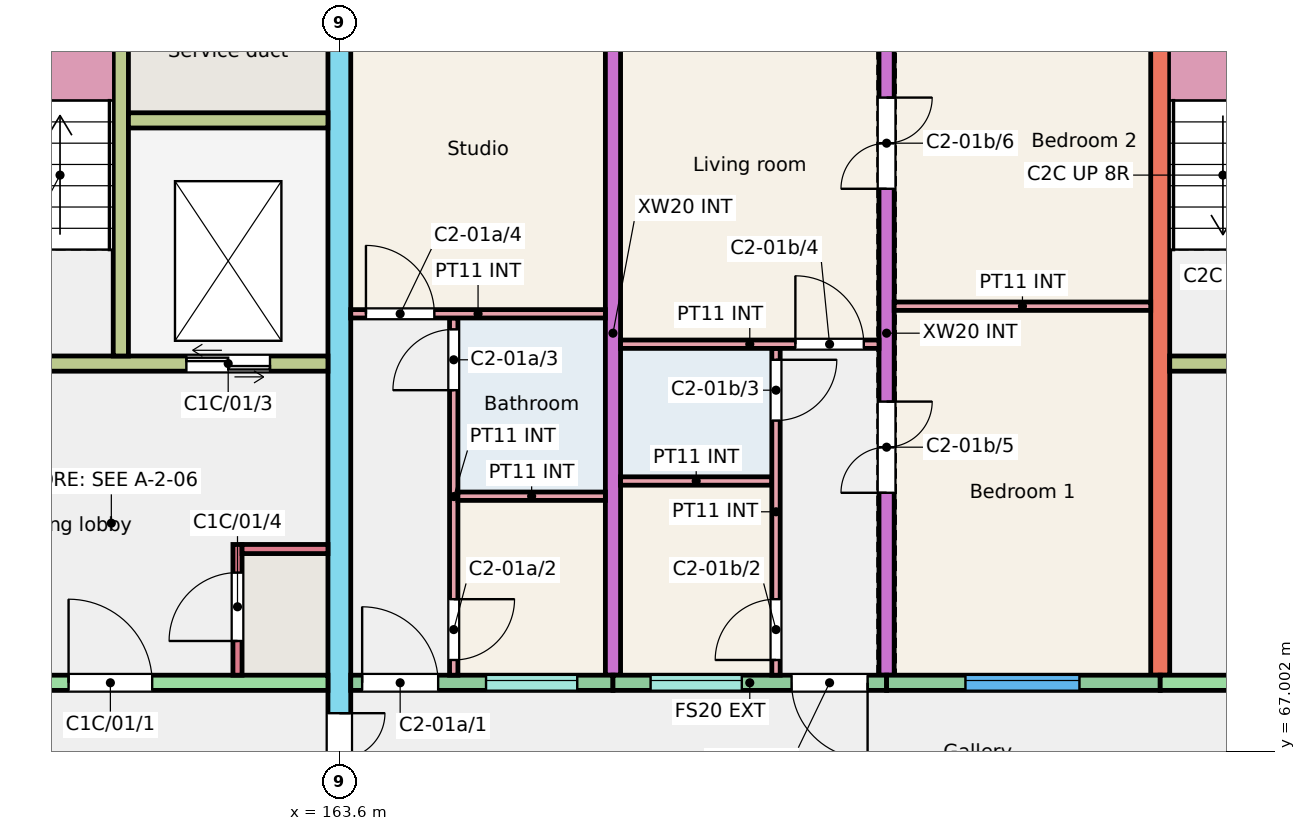
"""IFC4 building model, lengths in metres.
Left out: names, types, materials, properties, quantities, classifications, styles, units other than length and angle.
Written with IfcOpenShell. Run it as: python <this file> out.ifc"""

import sys

from ifc_helpers import new_model, si_unit, direction, frame, frame_2d, origin, place, context, subcontext, project, spatial, rectangle, extrude, element, fill, save


model = new_model("IFC4")
c1 = context("Model", 3, precision=1e-05, world=origin(), true_north=direction((0.0, 1.0)))
c2 = subcontext(c1, "Body", "Model", "MODEL_VIEW")
j1 = project(units=[si_unit("LENGTHUNIT", "METRE"), si_unit("PLANEANGLEUNIT", "RADIAN")], contexts=[c1])
p1 = place(None, origin())
s1 = spatial("IfcSite", under=j1, at=p1, CompositionType="ELEMENT")
p2 = place(p1, origin())
s2 = spatial("IfcBuilding", under=s1, at=p2, CompositionType="ELEMENT")
p3 = place(p2, frame((0.0, 0.0, 3.0)))
s3 = spatial("IfcBuildingStorey", under=s2, at=p3, CompositionType="ELEMENT", Elevation=3.0)
p4 = place(p3, frame((163.6, 66.0, 0.0), z_axis=(0.0, 0.0, 1.0), x_axis=(0.0, 1.0, 0.0)))
e1 = element("IfcWall", 1, at=p4, inside=s3, PredefinedType="SHEAR", context=c2, shape_type="SweptSolid", body=[
    extrude(rectangle(XDim=11.0, YDim=0.3, at=frame_2d((5.5, 0.0))), origin(), (0.0, 0.0, 1.0), 3.0),
])
p5 = place(p4, frame((0.3, 0.0, 0.0)))
e2 = element("IfcOpeningElement", 2, at=p5, cuts=e1, PredefinedType="OPENING", context=c2, shape_type="SweptSolid", body=[
    extrude(rectangle(XDim=1.2, YDim=2.1, at=frame_2d((0.6, 1.05))), frame((0.0, 0.16, 0.0), z_axis=(0.0, -1.0, 0.0), x_axis=(1.0, 0.0, 0.0)), (0.0, 0.0, 1.0), 0.32),
])
p6 = place(p3, frame((167.2, 68.0, 0.0), z_axis=(0.0, 0.0, 1.0), x_axis=(0.0, 1.0, 0.0)))
e3 = element("IfcWall", 3, at=p6, inside=s3, PredefinedType="SHEAR", context=c2, shape_type="SweptSolid", body=[
    extrude(rectangle(XDim=9.0, YDim=0.2, at=frame_2d((4.5, 0.0))), origin(), (0.0, 0.0, 1.0), 3.0),
])
p7 = place(p3, frame((170.8, 68.0, 0.0), z_axis=(0.0, 0.0, 1.0), x_axis=(0.0, 1.0, 0.0)))
e4 = element("IfcWall", 4, at=p7, inside=s3, PredefinedType="SHEAR", context=c2, shape_type="SweptSolid", body=[
    extrude(rectangle(XDim=9.0, YDim=0.2, at=frame_2d((4.5, 0.0))), origin(), (0.0, 0.0, 1.0), 3.0),
])
p8 = place(p7, frame((2.4, 0.0, 0.0)))
e5 = element("IfcOpeningElement", 5, at=p8, cuts=e4, PredefinedType="OPENING", context=c2, shape_type="SweptSolid", body=[
    extrude(rectangle(XDim=1.2, YDim=2.1, at=frame_2d((0.6, 1.05))), frame((0.0, 0.11, 0.0), z_axis=(0.0, -1.0, 0.0), x_axis=(1.0, 0.0, 0.0)), (0.0, 0.0, 1.0), 0.22),
])
p9 = place(p7, frame((6.4, 0.0, 0.0)))
e6 = element("IfcOpeningElement", 6, at=p9, cuts=e4, PredefinedType="OPENING", context=c2, shape_type="SweptSolid", body=[
    extrude(rectangle(XDim=1.2, YDim=2.1, at=frame_2d((0.6, 1.05))), frame((0.0, 0.11, 0.0), z_axis=(0.0, -1.0, 0.0), x_axis=(1.0, 0.0, 0.0)), (0.0, 0.0, 1.0), 0.22),
])
p10 = place(p3, frame((174.4, 68.0, 0.0), z_axis=(0.0, 0.0, 1.0), x_axis=(0.0, 1.0, 0.0)))
e7 = element("IfcWall", 7, at=p10, inside=s3, PredefinedType="SHEAR", context=c2, shape_type="SweptSolid", body=[
    extrude(rectangle(XDim=9.0, YDim=0.25, at=frame_2d((4.5, 0.0))), origin(), (0.0, 0.0, 1.0), 3.0),
])
p11 = place(p3, frame((157.6, 67.9, 0.0), z_axis=(0.0, 0.0, 1.0), x_axis=(1.0, 0.0, 0.0)))
e8 = element("IfcWall", 8, at=p11, inside=s3, PredefinedType="SHEAR", context=c2, shape_type="SweptSolid", body=[
    extrude(rectangle(XDim=5.85, YDim=0.2, at=frame_2d((2.925, 0.0))), origin(), (0.0, 0.0, 1.0), 3.0),
])
p12 = place(p11, frame((2.438, 0.0, 0.0)))
e9 = element("IfcOpeningElement", 9, at=p12, cuts=e8, PredefinedType="OPENING", context=c2, shape_type="SweptSolid", body=[
    extrude(rectangle(XDim=1.1, YDim=2.1, at=frame_2d((0.55, 1.05))), frame((0.0, 0.11, 0.0), z_axis=(0.0, -1.0, 0.0), x_axis=(1.0, 0.0, 0.0)), (0.0, 0.0, 1.0), 0.22),
])
p13 = place(p3, frame((157.725, 72.1, 0.0), z_axis=(0.0, 0.0, 1.0), x_axis=(1.0, 0.0, 0.0)))
e10 = element("IfcWall", 10, at=p13, inside=s3, PredefinedType="SHEAR", context=c2, shape_type="SweptSolid", body=[
    extrude(rectangle(XDim=5.725, YDim=0.2, at=frame_2d((2.862, 0.0))), origin(), (0.0, 0.0, 1.0), 3.0),
])
p14 = place(p13, frame((0.95, 0.0, 0.0)))
e11 = element("IfcOpeningElement", 11, at=p14, cuts=e10, PredefinedType="OPENING", context=c2, shape_type="SweptSolid", body=[
    extrude(rectangle(XDim=1.0, YDim=2.1, at=frame_2d((0.5, 1.05))), frame((0.0, 0.11, 0.0), z_axis=(0.0, -1.0, 0.0), x_axis=(1.0, 0.0, 0.0)), (0.0, 0.0, 1.0), 0.22),
])
p15 = place(p13, frame((3.863, 0.0, 0.0)))
e12 = element("IfcOpeningElement", 12, at=p15, cuts=e10, PredefinedType="OPENING", context=c2, shape_type="SweptSolid", body=[
    extrude(rectangle(XDim=1.1, YDim=2.1, at=frame_2d((0.55, 1.05))), frame((0.0, 0.11, 0.0), z_axis=(0.0, -1.0, 0.0), x_axis=(1.0, 0.0, 0.0)), (0.0, 0.0, 1.0), 0.22),
])
p16 = place(p3, frame((160.725, 72.2, 0.0), z_axis=(0.0, 0.0, 1.0), x_axis=(0.0, 1.0, 0.0)))
e13 = element("IfcWall", 13, at=p16, inside=s3, PredefinedType="SHEAR", context=c2, shape_type="SweptSolid", body=[
    extrude(rectangle(XDim=4.8, YDim=0.2, at=frame_2d((2.4, 0.0))), origin(), (0.0, 0.0, 1.0), 3.0),
])
p17 = place(p3, frame((160.825, 75.3, 0.0), z_axis=(0.0, 0.0, 1.0), x_axis=(1.0, 0.0, 0.0)))
e14 = element("IfcWall", 14, at=p17, inside=s3, PredefinedType="SHEAR", context=c2, shape_type="SweptSolid", body=[
    extrude(rectangle(XDim=2.625, YDim=0.2, at=frame_2d((1.312, 0.0))), origin(), (0.0, 0.0, 1.0), 3.0),
])
p18 = place(p3, frame((162.26, 68.0, 0.0), z_axis=(0.0, 0.0, 1.0), x_axis=(0.0, 1.0, 0.0)))
e15 = element("IfcWall", 15, at=p18, inside=s3, PredefinedType="SHEAR", context=c2, shape_type="SweptSolid", body=[
    extrude(rectangle(XDim=1.72, YDim=0.12, at=frame_2d((0.86, 0.0))), origin(), (0.0, 0.0, 1.0), 3.0),
])
p19 = place(p18, frame((0.45, 0.0, 0.0)))
e16 = element("IfcOpeningElement", 16, at=p19, cuts=e15, PredefinedType="OPENING", context=c2, shape_type="SweptSolid", body=[
    extrude(rectangle(XDim=0.9, YDim=2.1, at=frame_2d((0.45, 1.05))), frame((0.0, 0.07, 0.0), z_axis=(0.0, -1.0, 0.0), x_axis=(1.0, 0.0, 0.0)), (0.0, 0.0, 1.0), 0.14),
])
p20 = place(p3, frame((162.32, 69.66, 0.0), z_axis=(0.0, 0.0, 1.0), x_axis=(1.0, 0.0, 0.0)))
e17 = element("IfcWall", 17, at=p20, inside=s3, PredefinedType="SHEAR", context=c2, shape_type="SweptSolid", body=[
    extrude(rectangle(XDim=1.13, YDim=0.12, at=frame_2d((0.565, 0.0))), origin(), (0.0, 0.0, 1.0), 3.0),
])
p21 = place(p3, frame((163.75, 67.9, 0.0), z_axis=(0.0, 0.0, 1.0), x_axis=(1.0, 0.0, 0.0)))
e18 = element("IfcWall", 18, at=p21, inside=s3, PredefinedType="SOLIDWALL", context=c2, shape_type="SweptSolid", body=[
    extrude(rectangle(XDim=3.45, YDim=0.2, at=frame_2d((1.725, 0.0))), origin(), (0.0, 0.0, 1.0), 3.0),
])
p22 = place(p21, frame((1.78, 0.0, 1.1)))
e19 = element("IfcOpeningElement", 19, at=p22, cuts=e18, PredefinedType="OPENING", context=c2, shape_type="SweptSolid", body=[
    extrude(rectangle(XDim=1.2, YDim=1.3, at=frame_2d((0.6, 0.65))), frame((0.0, 0.11, 0.0), z_axis=(0.0, -1.0, 0.0), x_axis=(1.0, 0.0, 0.0)), (0.0, 0.0, 1.0), 0.22),
])
p23 = place(p21, frame((0.15, 0.0, 0.0)))
e20 = element("IfcOpeningElement", 20, at=p23, cuts=e18, PredefinedType="OPENING", context=c2, shape_type="SweptSolid", body=[
    extrude(rectangle(XDim=1.0, YDim=2.1, at=frame_2d((0.5, 1.05))), frame((0.0, 0.11, 0.0), z_axis=(0.0, -1.0, 0.0), x_axis=(1.0, 0.0, 0.0)), (0.0, 0.0, 1.0), 0.22),
])
p24 = place(p3, frame((167.2, 67.9, 0.0), z_axis=(0.0, 0.0, 1.0), x_axis=(1.0, 0.0, 0.0)))
e21 = element("IfcWall", 21, at=p24, inside=s3, PredefinedType="SOLIDWALL", context=c2, shape_type="SweptSolid", body=[
    extrude(rectangle(XDim=3.6, YDim=0.2, at=frame_2d((1.8, 0.0))), origin(), (0.0, 0.0, 1.0), 3.0),
])
p25 = place(p24, frame((0.495, 0.0, 1.1)))
e22 = element("IfcOpeningElement", 22, at=p25, cuts=e21, PredefinedType="OPENING", context=c2, shape_type="SweptSolid", body=[
    extrude(rectangle(XDim=1.2, YDim=1.3, at=frame_2d((0.6, 0.65))), frame((0.0, 0.11, 0.0), z_axis=(0.0, -1.0, 0.0), x_axis=(1.0, 0.0, 0.0)), (0.0, 0.0, 1.0), 0.22),
])
p26 = place(p24, frame((2.35, 0.0, 0.0)))
e23 = element("IfcOpeningElement", 23, at=p26, cuts=e21, PredefinedType="OPENING", context=c2, shape_type="SweptSolid", body=[
    extrude(rectangle(XDim=1.0, YDim=2.1, at=frame_2d((0.5, 1.05))), frame((0.0, 0.11, 0.0), z_axis=(0.0, -1.0, 0.0), x_axis=(1.0, 0.0, 0.0)), (0.0, 0.0, 1.0), 0.22),
])
p27 = place(p3, frame((170.8, 67.9, 0.0), z_axis=(0.0, 0.0, 1.0), x_axis=(1.0, 0.0, 0.0)))
e24 = element("IfcWall", 24, at=p27, inside=s3, PredefinedType="SOLIDWALL", context=c2, shape_type="SweptSolid", body=[
    extrude(rectangle(XDim=3.6, YDim=0.2, at=frame_2d((1.8, 0.0))), origin(), (0.0, 0.0, 1.0), 3.0),
])
p28 = place(p27, frame((1.038, 0.0, 0.9)))
e25 = element("IfcOpeningElement", 25, at=p28, cuts=e24, PredefinedType="OPENING", context=c2, shape_type="SweptSolid", body=[
    extrude(rectangle(XDim=1.5, YDim=1.5, at=frame_2d((0.75, 0.75))), frame((0.0, 0.11, 0.0), z_axis=(0.0, -1.0, 0.0), x_axis=(1.0, 0.0, 0.0)), (0.0, 0.0, 1.0), 0.22),
])
p29 = place(p3, frame((174.4, 67.9, 0.0), z_axis=(0.0, 0.0, 1.0), x_axis=(1.0, 0.0, 0.0)))
e26 = element("IfcWall", 26, at=p29, inside=s3, PredefinedType="SHEAR", context=c2, shape_type="SweptSolid", body=[
    extrude(rectangle(XDim=5.85, YDim=0.2, at=frame_2d((2.925, 0.0))), origin(), (0.0, 0.0, 1.0), 3.0),
])
p30 = place(p29, frame((2.438, 0.0, 0.0)))
e27 = element("IfcOpeningElement", 27, at=p30, cuts=e26, PredefinedType="OPENING", context=c2, shape_type="SweptSolid", body=[
    extrude(rectangle(XDim=1.1, YDim=2.1, at=frame_2d((0.55, 1.05))), frame((0.0, 0.11, 0.0), z_axis=(0.0, -1.0, 0.0), x_axis=(1.0, 0.0, 0.0)), (0.0, 0.0, 1.0), 0.22),
])
p31 = place(p3, frame((174.525, 72.1, 0.0), z_axis=(0.0, 0.0, 1.0), x_axis=(1.0, 0.0, 0.0)))
e28 = element("IfcWall", 28, at=p31, inside=s3, PredefinedType="SHEAR", context=c2, shape_type="SweptSolid", body=[
    extrude(rectangle(XDim=5.725, YDim=0.2, at=frame_2d((2.863, 0.0))), origin(), (0.0, 0.0, 1.0), 3.0),
])
p32 = place(p31, frame((0.95, 0.0, 0.0)))
e29 = element("IfcOpeningElement", 29, at=p32, cuts=e28, PredefinedType="OPENING", context=c2, shape_type="SweptSolid", body=[
    extrude(rectangle(XDim=1.0, YDim=2.1, at=frame_2d((0.5, 1.05))), frame((0.0, 0.11, 0.0), z_axis=(0.0, -1.0, 0.0), x_axis=(1.0, 0.0, 0.0)), (0.0, 0.0, 1.0), 0.22),
])
p33 = place(p31, frame((3.863, 0.0, 0.0)))
e30 = element("IfcOpeningElement", 30, at=p33, cuts=e28, PredefinedType="OPENING", context=c2, shape_type="SweptSolid", body=[
    extrude(rectangle(XDim=1.1, YDim=2.1, at=frame_2d((0.55, 1.05))), frame((0.0, 0.11, 0.0), z_axis=(0.0, -1.0, 0.0), x_axis=(1.0, 0.0, 0.0)), (0.0, 0.0, 1.0), 0.22),
])
p34 = place(p3, frame((165.105, 68.0, 0.0), z_axis=(0.0, 0.0, 1.0), x_axis=(0.0, 1.0, 0.0)))
e31 = element("IfcWall", 31, at=p34, inside=s3, PredefinedType="PARTITIONING", context=c2, shape_type="SweptSolid", body=[
    extrude(rectangle(XDim=4.7, YDim=0.11, at=frame_2d((2.35, 0.0))), origin(), (0.0, 0.0, 1.0), 2.8),
])
p35 = place(p34, frame((0.2, 0.0, 0.0)))
e32 = element("IfcOpeningElement", 32, at=p35, cuts=e31, PredefinedType="OPENING", context=c2, shape_type="SweptSolid", body=[
    extrude(rectangle(XDim=0.8, YDim=2.1, at=frame_2d((0.4, 1.05))), frame((0.0, 0.065, 0.0), z_axis=(0.0, -1.0, 0.0), x_axis=(1.0, 0.0, 0.0)), (0.0, 0.0, 1.0), 0.13),
])
p36 = place(p34, frame((3.75, 0.0, 0.0)))
e33 = element("IfcOpeningElement", 33, at=p36, cuts=e31, PredefinedType="OPENING", context=c2, shape_type="SweptSolid", body=[
    extrude(rectangle(XDim=0.8, YDim=2.1, at=frame_2d((0.4, 1.05))), frame((0.0, 0.065, 0.0), z_axis=(0.0, -1.0, 0.0), x_axis=(1.0, 0.0, 0.0)), (0.0, 0.0, 1.0), 0.13),
])
p37 = place(p3, frame((165.16, 70.355, 0.0), z_axis=(0.0, 0.0, 1.0), x_axis=(1.0, 0.0, 0.0)))
e34 = element("IfcWall", 34, at=p37, inside=s3, PredefinedType="PARTITIONING", context=c2, shape_type="SweptSolid", body=[
    extrude(rectangle(XDim=1.94, YDim=0.11, at=frame_2d((0.97, 0.0))), origin(), (0.0, 0.0, 1.0), 2.8),
])
p38 = place(p3, frame((163.75, 72.755, 0.0), z_axis=(0.0, 0.0, 1.0), x_axis=(1.0, 0.0, 0.0)))
e35 = element("IfcWall", 35, at=p38, inside=s3, PredefinedType="PARTITIONING", context=c2, shape_type="SweptSolid", body=[
    extrude(rectangle(XDim=3.35, YDim=0.11, at=frame_2d((1.675, 0.0))), origin(), (0.0, 0.0, 1.0), 2.8),
])
p39 = place(p38, frame((0.2, 0.0, 0.0)))
e36 = element("IfcOpeningElement", 36, at=p39, cuts=e35, PredefinedType="OPENING", context=c2, shape_type="SweptSolid", body=[
    extrude(rectangle(XDim=0.9, YDim=2.1, at=frame_2d((0.45, 1.05))), frame((0.0, 0.065, 0.0), z_axis=(0.0, -1.0, 0.0), x_axis=(1.0, 0.0, 0.0)), (0.0, 0.0, 1.0), 0.13),
])
p40 = place(p3, frame((167.3, 70.555, 0.0), z_axis=(0.0, 0.0, 1.0), x_axis=(1.0, 0.0, 0.0)))
e37 = element("IfcWall", 37, at=p40, inside=s3, PredefinedType="PARTITIONING", context=c2, shape_type="SweptSolid", body=[
    extrude(rectangle(XDim=1.99, YDim=0.11, at=frame_2d((0.995, 0.0))), origin(), (0.0, 0.0, 1.0), 2.8),
])
p41 = place(p3, frame((169.345, 68.0, 0.0), z_axis=(0.0, 0.0, 1.0), x_axis=(0.0, 1.0, 0.0)))
e38 = element("IfcWall", 38, at=p41, inside=s3, PredefinedType="PARTITIONING", context=c2, shape_type="SweptSolid", body=[
    extrude(rectangle(XDim=4.3, YDim=0.11, at=frame_2d((2.15, 0.0))), origin(), (0.0, 0.0, 1.0), 2.8),
])
p42 = place(p41, frame((0.2, 0.0, 0.0)))
e39 = element("IfcOpeningElement", 39, at=p42, cuts=e38, PredefinedType="OPENING", context=c2, shape_type="SweptSolid", body=[
    extrude(rectangle(XDim=0.8, YDim=2.1, at=frame_2d((0.4, 1.05))), frame((0.0, 0.065, 0.0), z_axis=(0.0, -1.0, 0.0), x_axis=(1.0, 0.0, 0.0)), (0.0, 0.0, 1.0), 0.13),
])
p43 = place(p41, frame((3.35, 0.0, 0.0)))
e40 = element("IfcOpeningElement", 40, at=p43, cuts=e38, PredefinedType="OPENING", context=c2, shape_type="SweptSolid", body=[
    extrude(rectangle(XDim=0.8, YDim=2.1, at=frame_2d((0.4, 1.05))), frame((0.0, 0.065, 0.0), z_axis=(0.0, -1.0, 0.0), x_axis=(1.0, 0.0, 0.0)), (0.0, 0.0, 1.0), 0.13),
])
p44 = place(p3, frame((167.3, 72.355, 0.0), z_axis=(0.0, 0.0, 1.0), x_axis=(1.0, 0.0, 0.0)))
e41 = element("IfcWall", 41, at=p44, inside=s3, PredefinedType="PARTITIONING", context=c2, shape_type="SweptSolid", body=[
    extrude(rectangle(XDim=3.4, YDim=0.11, at=frame_2d((1.7, 0.0))), origin(), (0.0, 0.0, 1.0), 2.8),
])
p45 = place(p44, frame((2.3, 0.0, 0.0)))
e42 = element("IfcOpeningElement", 42, at=p45, cuts=e41, PredefinedType="OPENING", context=c2, shape_type="SweptSolid", body=[
    extrude(rectangle(XDim=0.9, YDim=2.1, at=frame_2d((0.45, 1.05))), frame((0.0, 0.065, 0.0), z_axis=(0.0, -1.0, 0.0), x_axis=(1.0, 0.0, 0.0)), (0.0, 0.0, 1.0), 0.13),
])
p46 = place(p3, frame((170.9, 72.855, 0.0), z_axis=(0.0, 0.0, 1.0), x_axis=(1.0, 0.0, 0.0)))
e43 = element("IfcWall", 43, at=p46, inside=s3, PredefinedType="PARTITIONING", context=c2, shape_type="SweptSolid", body=[
    extrude(rectangle(XDim=3.375, YDim=0.11, at=frame_2d((1.688, 0.0))), origin(), (0.0, 0.0, 1.0), 2.8),
])
p47 = place(p22, origin())
e44 = element("IfcWindow", 44, at=p47, inside=s3, PartitioningType="SINGLE_PANEL", PredefinedType="WINDOW", context=c2, shape_type="SweptSolid", body=[
    extrude(rectangle(XDim=1.2, YDim=1.3, at=frame_2d((0.6, 0.65))), frame((0.0, 0.06, 0.0), z_axis=(0.0, -1.0, 0.0), x_axis=(1.0, 0.0, 0.0)), (0.0, 0.0, 1.0), 0.06),
])
fill(e19, e44)
p48 = place(p28, origin())
e45 = element("IfcWindow", 45, at=p48, inside=s3, PartitioningType="SINGLE_PANEL", PredefinedType="WINDOW", context=c2, shape_type="SweptSolid", body=[
    extrude(rectangle(XDim=1.5, YDim=1.5, at=frame_2d((0.75, 0.75))), frame((0.0, 0.06, 0.0), z_axis=(0.0, -1.0, 0.0), x_axis=(1.0, 0.0, 0.0)), (0.0, 0.0, 1.0), 0.06),
])
fill(e25, e45)
p49 = place(p25, origin())
e46 = element("IfcWindow", 46, at=p49, inside=s3, PartitioningType="SINGLE_PANEL", PredefinedType="WINDOW", context=c2, shape_type="SweptSolid", body=[
    extrude(rectangle(XDim=1.2, YDim=1.3, at=frame_2d((0.6, 0.65))), frame((0.0, 0.06, 0.0), z_axis=(0.0, -1.0, 0.0), x_axis=(1.0, 0.0, 0.0)), (0.0, 0.0, 1.0), 0.06),
])
fill(e22, e46)
p50 = place(p23, origin())
e47 = element("IfcDoor", 47, at=p50, inside=s3, OperationType="SINGLE_SWING_LEFT", PredefinedType="DOOR", context=c2, shape_type="SweptSolid", body=[
    extrude(rectangle(XDim=1.0, YDim=2.1, at=frame_2d((0.5, 1.05))), frame((0.0, 0.025, 0.0), z_axis=(0.0, -1.0, 0.0), x_axis=(1.0, 0.0, 0.0)), (0.0, 0.0, 1.0), 0.05),
])
fill(e20, e47)
p51 = place(p35, origin())
e48 = element("IfcDoor", 48, at=p51, inside=s3, OperationType="SINGLE_SWING_RIGHT", PredefinedType="DOOR", context=c2, shape_type="SweptSolid", body=[
    extrude(rectangle(XDim=0.8, YDim=2.1, at=frame_2d((0.4, 1.05))), frame((0.0, 0.025, 0.0), z_axis=(0.0, -1.0, 0.0), x_axis=(1.0, 0.0, 0.0)), (0.0, 0.0, 1.0), 0.05),
])
fill(e32, e48)
p52 = place(p36, origin())
e49 = element("IfcDoor", 49, at=p52, inside=s3, OperationType="SINGLE_SWING_LEFT", PredefinedType="DOOR", context=c2, shape_type="SweptSolid", body=[
    extrude(rectangle(XDim=0.8, YDim=2.1, at=frame_2d((0.4, 1.05))), frame((0.0, 0.025, 0.0), z_axis=(0.0, -1.0, 0.0), x_axis=(1.0, 0.0, 0.0)), (0.0, 0.0, 1.0), 0.05),
])
fill(e33, e49)
p53 = place(p39, origin())
e50 = element("IfcDoor", 50, at=p53, inside=s3, OperationType="SINGLE_SWING_LEFT", PredefinedType="DOOR", context=c2, shape_type="SweptSolid", body=[
    extrude(rectangle(XDim=0.9, YDim=2.1, at=frame_2d((0.45, 1.05))), frame((0.0, 0.025, 0.0), z_axis=(0.0, -1.0, 0.0), x_axis=(1.0, 0.0, 0.0)), (0.0, 0.0, 1.0), 0.05),
])
fill(e36, e50)
p54 = place(p26, origin())
e51 = element("IfcDoor", 51, at=p54, inside=s3, OperationType="SINGLE_SWING_RIGHT", PredefinedType="DOOR", context=c2, shape_type="SweptSolid", body=[
    extrude(rectangle(XDim=1.0, YDim=2.1, at=frame_2d((0.5, 1.05))), frame((0.0, 0.025, 0.0), z_axis=(0.0, -1.0, 0.0), x_axis=(1.0, 0.0, 0.0)), (0.0, 0.0, 1.0), 0.05),
])
fill(e23, e51)
p55 = place(p42, origin())
e52 = element("IfcDoor", 52, at=p55, inside=s3, OperationType="SINGLE_SWING_LEFT", PredefinedType="DOOR", context=c2, shape_type="SweptSolid", body=[
    extrude(rectangle(XDim=0.8, YDim=2.1, at=frame_2d((0.4, 1.05))), frame((0.0, 0.025, 0.0), z_axis=(0.0, -1.0, 0.0), x_axis=(1.0, 0.0, 0.0)), (0.0, 0.0, 1.0), 0.05),
])
fill(e39, e52)
p56 = place(p43, origin())
e53 = element("IfcDoor", 53, at=p56, inside=s3, OperationType="SINGLE_SWING_RIGHT", PredefinedType="DOOR", context=c2, shape_type="SweptSolid", body=[
    extrude(rectangle(XDim=0.8, YDim=2.1, at=frame_2d((0.4, 1.05))), frame((0.0, 0.025, 0.0), z_axis=(0.0, -1.0, 0.0), x_axis=(1.0, 0.0, 0.0)), (0.0, 0.0, 1.0), 0.05),
])
fill(e40, e53)
p57 = place(p45, origin())
e54 = element("IfcDoor", 54, at=p57, inside=s3, OperationType="SINGLE_SWING_LEFT", PredefinedType="DOOR", context=c2, shape_type="SweptSolid", body=[
    extrude(rectangle(XDim=0.9, YDim=2.1, at=frame_2d((0.45, 1.05))), frame((0.0, 0.025, 0.0), z_axis=(0.0, -1.0, 0.0), x_axis=(1.0, 0.0, 0.0)), (0.0, 0.0, 1.0), 0.05),
])
fill(e42, e54)
p58 = place(p8, origin())
e55 = element("IfcDoor", 55, at=p58, inside=s3, OperationType="DOUBLE_DOOR_SINGLE_SWING", PredefinedType="DOOR", context=c2, shape_type="SweptSolid", body=[
    extrude(rectangle(XDim=1.2, YDim=2.1, at=frame_2d((0.6, 1.05))), frame((0.0, 0.025, 0.0), z_axis=(0.0, -1.0, 0.0), x_axis=(1.0, 0.0, 0.0)), (0.0, 0.0, 1.0), 0.05),
])
fill(e5, e55)
p59 = place(p9, origin())
e56 = element("IfcDoor", 56, at=p59, inside=s3, OperationType="DOUBLE_DOOR_SINGLE_SWING", PredefinedType="DOOR", context=c2, shape_type="SweptSolid", body=[
    extrude(rectangle(XDim=1.2, YDim=2.1, at=frame_2d((0.6, 1.05))), frame((0.0, 0.025, 0.0), z_axis=(0.0, -1.0, 0.0), x_axis=(1.0, 0.0, 0.0)), (0.0, 0.0, 1.0), 0.05),
])
fill(e6, e56)
p60 = place(p12, origin())
e57 = element("IfcDoor", 57, at=p60, inside=s3, OperationType="SINGLE_SWING_LEFT", PredefinedType="DOOR", context=c2, shape_type="SweptSolid", body=[
    extrude(rectangle(XDim=1.1, YDim=2.1, at=frame_2d((0.55, 1.05))), frame((0.0, 0.025, 0.0), z_axis=(0.0, -1.0, 0.0), x_axis=(1.0, 0.0, 0.0)), (0.0, 0.0, 1.0), 0.05),
])
fill(e9, e57)
p61 = place(p15, origin())
e58 = element("IfcDoor", 58, at=p61, inside=s3, OperationType="DOUBLE_DOOR_SLIDING", PredefinedType="DOOR", context=c2, shape_type="SweptSolid", body=[
    extrude(rectangle(XDim=1.1, YDim=2.1, at=frame_2d((0.55, 1.05))), frame((0.0, 0.025, 0.0), z_axis=(0.0, -1.0, 0.0), x_axis=(1.0, 0.0, 0.0)), (0.0, 0.0, 1.0), 0.05),
])
fill(e12, e58)
p62 = place(p19, origin())
e59 = element("IfcDoor", 59, at=p62, inside=s3, OperationType="SINGLE_SWING_LEFT", PredefinedType="DOOR", context=c2, shape_type="SweptSolid", body=[
    extrude(rectangle(XDim=0.9, YDim=2.1, at=frame_2d((0.45, 1.05))), frame((0.0, 0.025, 0.0), z_axis=(0.0, -1.0, 0.0), x_axis=(1.0, 0.0, 0.0)), (0.0, 0.0, 1.0), 0.05),
])
fill(e16, e59)
p63 = place(p5, origin())
e60 = element("IfcDoor", 60, at=p63, inside=s3, OperationType="DOUBLE_DOOR_SINGLE_SWING", PredefinedType="DOOR", context=c2, shape_type="SweptSolid", body=[
    extrude(rectangle(XDim=1.2, YDim=2.1, at=frame_2d((0.6, 1.05))), frame((0.0, 0.025, 0.0), z_axis=(0.0, -1.0, 0.0), x_axis=(1.0, 0.0, 0.0)), (0.0, 0.0, 1.0), 0.05),
])
fill(e2, e60)
save(model, sys.argv[1])
